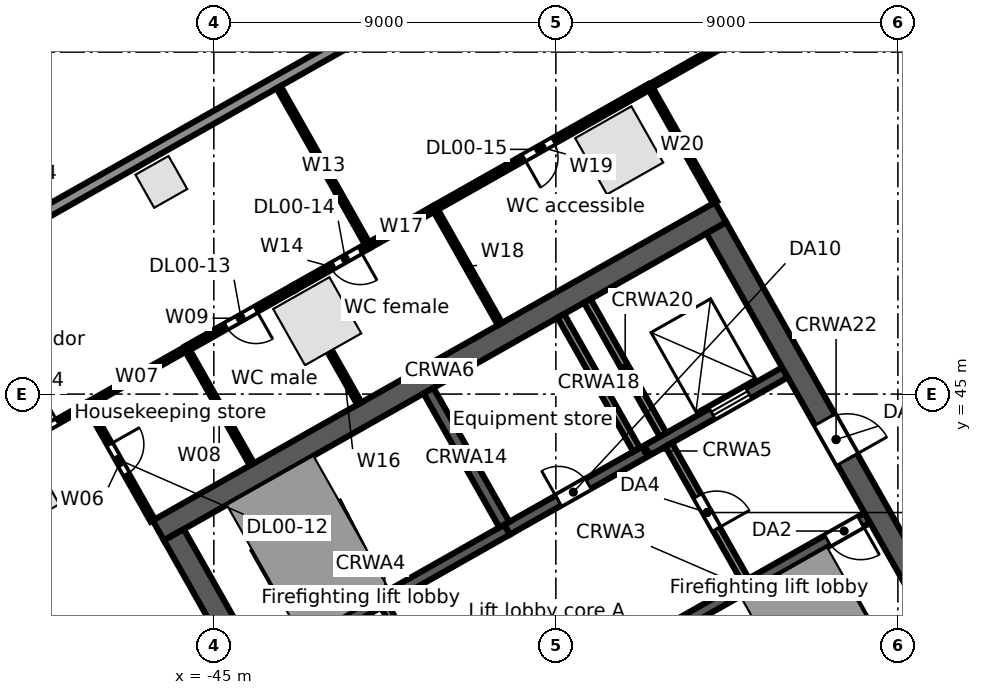
"""IFC4 building model, lengths in metres.
Left out: names, types, materials, properties, quantities, classifications, styles, units other than length and angle.
Written with IfcOpenShell. Run it as: python <this file> out.ifc"""

import sys

from ifc_helpers import new_model, si_unit, direction, frame, frame_2d, origin, origin_2d, place, context, subcontext, project, spatial, rectangle, extrude, element, fill, save


model = new_model("IFC4")
c1 = context("Model", 3, precision=1e-05, world=origin(), true_north=direction((0.0, 1.0)))
c2 = subcontext(c1, "Body", "Model", "MODEL_VIEW")
j1 = project(units=[si_unit("LENGTHUNIT", "METRE"), si_unit("PLANEANGLEUNIT", "RADIAN")], contexts=[c1])
p1 = place(None, origin())
s1 = spatial("IfcSite", under=j1, at=p1, CompositionType="ELEMENT")
p2 = place(p1, origin())
s2 = spatial("IfcBuilding", under=s1, at=p2, CompositionType="ELEMENT")
p3 = place(p2, origin())
s3 = spatial("IfcBuildingStorey", under=s2, at=p3, CompositionType="ELEMENT", Elevation=0.0)
for number, where, z_axis, x_axis in (
    (1, (-34.334, 51.414, 0.0), (0.0, 0.0, 1.0), (-0.87, -0.492, 0.0)),
    (2, (-42.28, 46.919, 0.0), (0.0, 0.0, 1.0), (-0.87, -0.492, 0.0)),
    (3, (-50.226, 42.423, 0.0), (0.0, 0.0, 1.0), (-0.87, -0.492, 0.0)),
):
    element("IfcColumn", number, at=place(p3, frame(where, z_axis=z_axis, x_axis=x_axis)), inside=s3, PredefinedType="COLUMN", context=c2, shape_type="SweptSolid", body=[
        extrude(rectangle(XDim=1.7, YDim=1.7, at=origin_2d()), origin(), (0.0, 0.0, 1.0), 6.5),
    ])
p4 = place(p3, frame((-46.381, 50.584, 0.0), z_axis=(0.0, 0.0, 1.0), x_axis=(-0.87035569594, -0.492423560103, 0.0)))
e4 = element("IfcColumn", 4, at=p4, inside=s3, PredefinedType="COLUMN", context=c2, shape_type="SweptSolid", body=[
    extrude(rectangle(XDim=1.0, YDim=1.0, at=origin_2d()), origin(), (0.0, 0.0, 1.0), 6.5),
])
p5 = place(p3, frame((-63.707, 41.701, 0.0), z_axis=(0.0, 0.0, 1.0), x_axis=(0.870355510268, 0.492423888277, 0.0)))
e5 = element("IfcWall", 5, at=p5, inside=s3, PredefinedType="STANDARD", context=c2, shape_type="SweptSolid", body=[
    extrude(rectangle(XDim=67.903, YDim=0.3, at=frame_2d((33.952, 0.0))), origin(), (0.0, 0.0, 1.0), 6.15),
])
p6 = place(p5, frame((44.274, 0.0, 0.0)))
e6 = element("IfcOpeningElement", 6, at=p6, cuts=e5, PredefinedType="OPENING", context=c2, shape_type="SweptSolid", body=[
    extrude(rectangle(XDim=1.2, YDim=2.4, at=frame_2d((0.6, 1.2))), frame((0.0, 0.16, 0.0), z_axis=(0.0, -1.0, 0.0), x_axis=(1.0, 0.0, 0.0)), (0.0, 0.0, 1.0), 0.32),
])
p7 = place(p5, frame((15.222, 0.0, 0.0)))
e7 = element("IfcOpeningElement", 7, at=p7, cuts=e5, PredefinedType="OPENING", context=c2, shape_type="SweptSolid", body=[
    extrude(rectangle(XDim=1.2, YDim=2.4, at=frame_2d((0.6, 1.2))), frame((0.0, 0.16, 0.0), z_axis=(0.0, -1.0, 0.0), x_axis=(1.0, 0.0, 0.0)), (0.0, 0.0, 1.0), 0.32),
])
p8 = place(p3, frame((-34.245, 38.097, 0.0), z_axis=(0.0, 0.0, 1.0), x_axis=(0.870364910201, 0.492407273597, 0.0)))
e8 = element("IfcWall", 8, at=p8, inside=s3, PredefinedType="SOLIDWALL", context=c2, shape_type="SweptSolid", body=[
    extrude(rectangle(XDim=7.4, YDim=0.3, at=frame_2d((3.7, 0.0))), origin(), (0.0, 0.0, 1.0), 6.15),
])
p9 = place(p8, frame((6.2, 0.0, 0.0)))
e9 = element("IfcOpeningElement", 9, at=p9, cuts=e8, PredefinedType="OPENING", context=c2, shape_type="SweptSolid", body=[
    extrude(rectangle(XDim=1.0, YDim=2.1, at=frame_2d((0.5, 1.05))), frame((0.0, 0.16, 0.0), z_axis=(0.0, -1.0, 0.0), x_axis=(1.0, 0.0, 0.0)), (0.0, 0.0, 1.0), 0.32),
])
p10 = place(p3, frame((-43.723, 37.791, 0.0), z_axis=(0.0, 0.0, 1.0), x_axis=(0.87035077051, 0.49243226567, 0.0)))
e10 = element("IfcWall", 10, at=p10, inside=s3, PredefinedType="SOLIDWALL", context=c2, shape_type="SweptSolid", body=[
    extrude(rectangle(XDim=7.4, YDim=0.3, at=frame_2d((3.7, 0.0))), origin(), (0.0, 0.0, 1.0), 6.15),
])
p11 = place(p10, frame((0.2, 0.0, 0.0)))
e11 = element("IfcOpeningElement", 11, at=p11, cuts=e10, PredefinedType="OPENING", context=c2, shape_type="SweptSolid", body=[
    extrude(rectangle(XDim=1.0, YDim=2.1, at=frame_2d((0.5, 1.05))), frame((0.0, 0.16, 0.0), z_axis=(0.0, -1.0, 0.0), x_axis=(1.0, 0.0, 0.0)), (0.0, 0.0, 1.0), 0.32),
])
p12 = place(p3, frame((-37.282, 41.435, 0.0), z_axis=(0.0, 0.0, 1.0), x_axis=(0.870356516133, 0.492422110414, 0.0)))
e12 = element("IfcWall", 12, at=p12, inside=s3, PredefinedType="SOLIDWALL", context=c2, shape_type="SweptSolid", body=[
    extrude(rectangle(XDim=8.4, YDim=0.3, at=frame_2d((4.2, 0.0))), origin(), (0.0, 0.0, 1.0), 6.15),
])
p13 = place(p12, frame((6.2, 0.0, 0.0)))
e13 = element("IfcOpeningElement", 13, at=p13, cuts=e12, PredefinedType="OPENING", context=c2, shape_type="SweptSolid", body=[
    extrude(rectangle(XDim=1.1, YDim=2.1, at=frame_2d((0.55, 1.05))), frame((0.0, 0.16, 0.0), z_axis=(0.0, -1.0, 0.0), x_axis=(1.0, 0.0, 0.0)), (0.0, 0.0, 1.0), 0.32),
])
p14 = place(p12, frame((1.55, 0.0, 0.0)))
e14 = element("IfcOpeningElement", 14, at=p14, cuts=e12, PredefinedType="OPENING", context=c2, shape_type="SweptSolid", body=[
    extrude(rectangle(XDim=0.9, YDim=2.1, at=frame_2d((0.45, 1.05))), frame((0.0, 0.16, 0.0), z_axis=(0.0, -1.0, 0.0), x_axis=(1.0, 0.0, 0.0)), (0.0, 0.0, 1.0), 0.32),
])
p15 = place(p3, frame((-46.461, 41.412, 0.0), z_axis=(0.0, 0.0, 1.0), x_axis=(0.870350116061, 0.492433422375, 0.0)))
e15 = element("IfcWall", 15, at=p15, inside=s3, PredefinedType="SOLIDWALL", context=c2, shape_type="SweptSolid", body=[
    extrude(rectangle(XDim=17.0, YDim=0.6, at=frame_2d((8.5, 0.0))), origin(), (0.0, 0.0, 1.0), 6.15),
])
p16 = place(p3, frame((-46.052, 41.298, 0.0), z_axis=(0.0, 0.0, 1.0), x_axis=(0.492418598281, -0.870358503186, 0.0)))
e16 = element("IfcWall", 16, at=p16, inside=s3, PredefinedType="SOLIDWALL", context=c2, shape_type="SweptSolid", body=[
    extrude(rectangle(XDim=12.8, YDim=0.6, at=frame_2d((6.4, 0.0))), origin(), (0.0, 0.0, 1.0), 6.15),
])
p17 = place(p16, frame((5.8, 0.0, 0.0)))
e17 = element("IfcOpeningElement", 17, at=p17, cuts=e16, PredefinedType="OPENING", context=c2, shape_type="SweptSolid", body=[
    extrude(rectangle(XDim=1.2, YDim=2.1, at=frame_2d((0.6, 1.05))), frame((0.0, 0.31, 0.0), z_axis=(0.0, -1.0, 0.0), x_axis=(1.0, 0.0, 0.0)), (0.0, 0.0, 1.0), 0.62),
])
p18 = place(p3, frame((-40.516, 39.433, 0.0), z_axis=(0.0, 0.0, 1.0), x_axis=(0.492453559952, -0.87033872216, 0.0)))
e18 = element("IfcWall", 18, at=p18, inside=s3, PredefinedType="PARTITIONING", context=c2, shape_type="SweptSolid", body=[
    extrude(rectangle(XDim=4.1, YDim=0.2, at=frame_2d((2.05, 0.0))), origin(), (0.0, 0.0, 1.0), 6.15),
])
p19 = place(p18, frame((1.55, 0.0, 0.0)))
e19 = element("IfcOpeningElement", 19, at=p19, cuts=e18, PredefinedType="OPENING", context=c2, shape_type="SweptSolid", body=[
    extrude(rectangle(XDim=1.0, YDim=2.1, at=frame_2d((0.5, 1.05))), frame((0.0, 0.11, 0.0), z_axis=(0.0, -1.0, 0.0), x_axis=(1.0, 0.0, 0.0)), (0.0, 0.0, 1.0), 0.22),
])
p20 = place(p3, frame((-39.35, 45.09, 0.0), z_axis=(0.0, 0.0, 1.0), x_axis=(0.49241474071, -0.870360685654, 0.0)))
e20 = element("IfcWall", 20, at=p20, inside=s3, PredefinedType="SOLIDWALL", context=c2, shape_type="SweptSolid", body=[
    extrude(rectangle(XDim=4.05, YDim=0.3, at=frame_2d((2.025, 0.0))), origin(), (0.0, 0.0, 1.0), 6.15),
])
p21 = place(p3, frame((-35.869, 47.06, 0.0), z_axis=(0.0, 0.0, 1.0), x_axis=(0.49241474071, -0.870360685654, 0.0)))
e21 = element("IfcWall", 21, at=p21, inside=s3, PredefinedType="SOLIDWALL", context=c2, shape_type="SweptSolid", body=[
    extrude(rectangle(XDim=4.05, YDim=0.2, at=frame_2d((2.025, 0.0))), origin(), (0.0, 0.0, 1.0), 6.15),
])
p22 = place(p3, frame((-33.031, 43.667, 0.0), z_axis=(0.0, 0.0, 1.0), x_axis=(0.492408451753, -0.87036424366, 0.0)))
e22 = element("IfcWall", 22, at=p22, inside=s3, PredefinedType="PARTITIONING", context=c2, shape_type="SweptSolid", body=[
    extrude(rectangle(XDim=4.1, YDim=0.2, at=frame_2d((2.05, 0.0))), origin(), (0.0, 0.0, 1.0), 6.15),
])
p23 = place(p22, frame((1.55, 0.0, 0.0)))
e23 = element("IfcOpeningElement", 23, at=p23, cuts=e22, PredefinedType="OPENING", context=c2, shape_type="SweptSolid", body=[
    extrude(rectangle(XDim=1.0, YDim=2.1, at=frame_2d((0.5, 1.05))), frame((0.0, 0.11, 0.0), z_axis=(0.0, -1.0, 0.0), x_axis=(1.0, 0.0, 0.0)), (0.0, 0.0, 1.0), 0.22),
])
p24 = place(p3, frame((-35.173, 47.454, 0.0), z_axis=(0.0, 0.0, 1.0), x_axis=(0.492440575896, -0.870346068648, 0.0)))
e24 = element("IfcWall", 24, at=p24, inside=s3, PredefinedType="SOLIDWALL", context=c2, shape_type="SweptSolid", body=[
    extrude(rectangle(XDim=4.05, YDim=0.2, at=frame_2d((2.025, 0.0))), origin(), (0.0, 0.0, 1.0), 6.15),
])
p25 = place(p3, frame((-31.778, 49.374, 0.0), z_axis=(0.0, 0.0, 1.0), x_axis=(0.492433046652, -0.870350328641, 0.0)))
e25 = element("IfcWall", 25, at=p25, inside=s3, PredefinedType="SOLIDWALL", context=c2, shape_type="SweptSolid", body=[
    extrude(rectangle(XDim=12.8, YDim=0.6, at=frame_2d((6.4, 0.0))), origin(), (0.0, 0.0, 1.0), 6.15),
])
p26 = place(p25, frame((5.8, 0.0, 0.0)))
e26 = element("IfcOpeningElement", 26, at=p26, cuts=e25, PredefinedType="OPENING", context=c2, shape_type="SweptSolid", body=[
    extrude(rectangle(XDim=1.2, YDim=2.1, at=frame_2d((0.6, 1.05))), frame((0.0, 0.31, 0.0), z_axis=(0.0, -1.0, 0.0), x_axis=(1.0, 0.0, 0.0)), (0.0, 0.0, 1.0), 0.62),
])
p27 = place(p3, frame((-51.596, 42.873, 0.0), z_axis=(0.0, 0.0, 1.0), x_axis=(0.87043427122, 0.492284652905, 0.0)))
e27 = element("IfcWall", 27, at=p27, inside=s3, PredefinedType="PARTITIONING", context=c2, shape_type="SweptSolid", body=[
    extrude(rectangle(XDim=3.75, YDim=0.125, at=frame_2d((1.875, 0.0))), origin(), (0.0, 0.0, 1.0), 6.15),
])
p28 = place(p27, frame((1.95, 0.0, 0.0)))
e28 = element("IfcOpeningElement", 28, at=p28, cuts=e27, PredefinedType="OPENING", context=c2, shape_type="SweptSolid", body=[
    extrude(rectangle(XDim=0.9, YDim=2.1, at=frame_2d((0.45, 1.05))), frame((0.0, 0.073, 0.0), z_axis=(0.0, -1.0, 0.0), x_axis=(1.0, 0.0, 0.0)), (0.0, 0.0, 1.0), 0.145),
])
p29 = place(p3, frame((-51.596, 42.873, 0.0), z_axis=(0.0, 0.0, 1.0), x_axis=(0.492435038471, -0.870349201692, 0.0)))
e29 = element("IfcWall", 29, at=p29, inside=s3, PredefinedType="PARTITIONING", context=c2, shape_type="SweptSolid", body=[
    extrude(rectangle(XDim=15.501, YDim=0.125, at=frame_2d((7.75, 0.0))), origin(), (0.0, 0.0, 1.0), 5.212),
])
p30 = place(p29, frame((7.2, 0.0, 0.0)))
e30 = element("IfcOpeningElement", 30, at=p30, cuts=e29, PredefinedType="OPENING", context=c2, shape_type="SweptSolid", body=[
    extrude(rectangle(XDim=0.9, YDim=2.1, at=frame_2d((0.45, 1.05))), frame((0.0, 0.073, 0.0), z_axis=(0.0, -1.0, 0.0), x_axis=(1.0, 0.0, 0.0)), (0.0, 0.0, 1.0), 0.145),
])
p31 = place(p3, frame((-48.332, 44.719, 0.0), z_axis=(0.0, 0.0, 1.0), x_axis=(0.492392845909, -0.87037307248, 0.0)))
e31 = element("IfcWall", 31, at=p31, inside=s3, PredefinedType="PARTITIONING", context=c2, shape_type="SweptSolid", body=[
    extrude(rectangle(XDim=3.5, YDim=0.125, at=frame_2d((1.75, 0.0))), origin(), (0.0, 0.0, 1.0), 5.43),
])
p32 = place(p31, frame((1.2, 0.0, 0.0)))
e32 = element("IfcOpeningElement", 32, at=p32, cuts=e31, PredefinedType="OPENING", context=c2, shape_type="SweptSolid", body=[
    extrude(rectangle(XDim=0.9, YDim=2.1, at=frame_2d((0.45, 1.05))), frame((0.0, 0.073, 0.0), z_axis=(0.0, -1.0, 0.0), x_axis=(1.0, 0.0, 0.0)), (0.0, 0.0, 1.0), 0.145),
])
p33 = place(p3, frame((-48.332, 44.719, 0.0), z_axis=(0.0, 0.0, 1.0), x_axis=(0.870388475779, 0.492365617434, 0.0)))
e33 = element("IfcWall", 33, at=p33, inside=s3, PredefinedType="PARTITIONING", context=c2, shape_type="SweptSolid", body=[
    extrude(rectangle(XDim=3.0, YDim=0.125, at=frame_2d((1.5, 0.0))), origin(), (0.0, 0.0, 1.0), 6.15),
])
p34 = place(p3, frame((-45.721, 46.196, 0.0), z_axis=(0.0, 0.0, 1.0), x_axis=(0.492310098002, -0.870419879946, 0.0)))
e34 = element("IfcWall", 34, at=p34, inside=s3, PredefinedType="PARTITIONING", context=c2, shape_type="SweptSolid", body=[
    extrude(rectangle(XDim=3.5, YDim=0.125, at=frame_2d((1.75, 0.0))), origin(), (0.0, 0.0, 1.0), 5.43),
])
p35 = place(p3, frame((-45.721, 46.196, 0.0), z_axis=(0.0, 0.0, 1.0), x_axis=(0.870278724491, 0.492559581877, 0.0)))
e35 = element("IfcWall", 35, at=p35, inside=s3, PredefinedType="PARTITIONING", context=c2, shape_type="SweptSolid", body=[
    extrude(rectangle(XDim=3.25, YDim=0.15, at=frame_2d((1.625, 0.0))), origin(), (0.0, 0.0, 1.0), 5.53),
])
p36 = place(p35, frame((1.2, 0.0, 0.0)))
e36 = element("IfcOpeningElement", 36, at=p36, cuts=e35, PredefinedType="OPENING", context=c2, shape_type="SweptSolid", body=[
    extrude(rectangle(XDim=0.9, YDim=2.1, at=frame_2d((0.45, 1.05))), frame((0.0, 0.085, 0.0), z_axis=(0.0, -1.0, 0.0), x_axis=(1.0, 0.0, 0.0)), (0.0, 0.0, 1.0), 0.17),
])
p37 = place(p3, frame((-43.295, 53.077, 0.0), z_axis=(0.0, 0.0, 1.0), x_axis=(0.492503605136, -0.87031040378, 0.0)))
e37 = element("IfcWall", 37, at=p37, inside=s3, PredefinedType="PARTITIONING", context=c2, shape_type="SweptSolid", body=[
    extrude(rectangle(XDim=4.793, YDim=0.125, at=frame_2d((2.397, 0.0))), origin(), (0.0, 0.0, 1.0), 5.43),
])
p38 = place(p3, frame((-42.892, 47.797, 0.0), z_axis=(0.0, 0.0, 1.0), x_axis=(0.870332332106, 0.492464853254, 0.0)))
e38 = element("IfcWall", 38, at=p38, inside=s3, PredefinedType="PARTITIONING", context=c2, shape_type="SweptSolid", body=[
    extrude(rectangle(XDim=2.25, YDim=0.15, at=frame_2d((1.125, 0.0))), origin(), (0.0, 0.0, 1.0), 6.15),
])
p39 = place(p38, frame((1.1, 0.0, 0.0)))
e39 = element("IfcOpeningElement", 39, at=p39, cuts=e38, PredefinedType="OPENING", context=c2, shape_type="SweptSolid", body=[
    extrude(rectangle(XDim=0.9, YDim=2.1, at=frame_2d((0.45, 1.05))), frame((0.0, 0.085, 0.0), z_axis=(0.0, -1.0, 0.0), x_axis=(1.0, 0.0, 0.0)), (0.0, 0.0, 1.0), 0.17),
])
p40 = place(p3, frame((-41.949, 46.129, 0.0), z_axis=(0.0, 0.0, 1.0), x_axis=(0.492366981934, -0.870387703901, 0.0)))
e40 = element("IfcWall", 40, at=p40, inside=s3, PredefinedType="PARTITIONING", context=c2, shape_type="SweptSolid", body=[
    extrude(rectangle(XDim=1.584, YDim=0.125, at=frame_2d((0.792, 0.0))), origin(), (0.0, 0.0, 1.0), 5.73),
])
p41 = place(p3, frame((-40.934, 48.905, 0.0), z_axis=(0.0, 0.0, 1.0), x_axis=(0.870592396556, 0.492004958368, 0.0)))
e41 = element("IfcWall", 41, at=p41, inside=s3, PredefinedType="PARTITIONING", context=c2, shape_type="SweptSolid", body=[
    extrude(rectangle(XDim=2.0, YDim=0.15, at=frame_2d((1.0, 0.0))), origin(), (0.0, 0.0, 1.0), 6.15),
])
p42 = place(p3, frame((-39.193, 49.889, 0.0), z_axis=(0.0, 0.0, 1.0), x_axis=(0.492392845909, -0.87037307248, 0.0)))
e42 = element("IfcWall", 42, at=p42, inside=s3, PredefinedType="PARTITIONING", context=c2, shape_type="SweptSolid", body=[
    extrude(rectangle(XDim=3.5, YDim=0.125, at=frame_2d((1.75, 0.0))), origin(), (0.0, 0.0, 1.0), 5.43),
])
p43 = place(p3, frame((-39.193, 49.889, 0.0), z_axis=(0.0, 0.0, 1.0), x_axis=(0.870324897112, 0.492477992876, 0.0)))
e43 = element("IfcWall", 43, at=p43, inside=s3, PredefinedType="PARTITIONING", context=c2, shape_type="SweptSolid", body=[
    extrude(rectangle(XDim=6.5, YDim=0.15, at=frame_2d((3.25, 0.0))), origin(), (0.0, 0.0, 1.0), 5.53),
])
p44 = place(p43, frame((2.7, 0.0, 0.0)))
e44 = element("IfcOpeningElement", 44, at=p44, cuts=e43, PredefinedType="OPENING", context=c2, shape_type="SweptSolid", body=[
    extrude(rectangle(XDim=0.9, YDim=2.1, at=frame_2d((0.45, 1.05))), frame((0.0, 0.085, 0.0), z_axis=(0.0, -1.0, 0.0), x_axis=(1.0, 0.0, 0.0)), (0.0, 0.0, 1.0), 0.17),
])
p45 = place(p3, frame((-33.536, 53.09, 0.0), z_axis=(0.0, 0.0, 1.0), x_axis=(0.492521469645, -0.870300294116, 0.0)))
e45 = element("IfcWall", 45, at=p45, inside=s3, PredefinedType="PARTITIONING", context=c2, shape_type="SweptSolid", body=[
    extrude(rectangle(XDim=3.5, YDim=0.125, at=frame_2d((1.75, 0.0))), origin(), (0.0, 0.0, 1.0), 5.43),
])
p46 = place(p3, frame((-33.536, 53.09, 0.0), z_axis=(0.0, 0.0, 1.0), x_axis=(0.870327439455, 0.492473499928, 0.0)))
e46 = element("IfcWall", 46, at=p46, inside=s3, PredefinedType="PARTITIONING", context=c2, shape_type="SweptSolid", body=[
    extrude(rectangle(XDim=8.0, YDim=0.125, at=frame_2d((4.0, 0.0))), origin(), (0.0, 0.0, 1.0), 5.212),
])
p47 = place(p46, frame((3.45, 0.0, 0.0)))
e47 = element("IfcOpeningElement", 47, at=p47, cuts=e46, PredefinedType="OPENING", context=c2, shape_type="SweptSolid", body=[
    extrude(rectangle(XDim=0.9, YDim=2.1, at=frame_2d((0.45, 1.05))), frame((0.0, 0.073, 0.0), z_axis=(0.0, -1.0, 0.0), x_axis=(1.0, 0.0, 0.0)), (0.0, 0.0, 1.0), 0.145),
])
p48 = place(p13, origin())
e48 = element("IfcDoor", 48, at=p48, inside=s3, OperationType="DOUBLE_DOOR_SLIDING", PredefinedType="DOOR", context=c2, shape_type="SweptSolid", body=[
    extrude(rectangle(XDim=1.1, YDim=2.1, at=frame_2d((0.55, 1.05))), frame((0.0, 0.025, 0.0), z_axis=(0.0, -1.0, 0.0), x_axis=(1.0, 0.0, 0.0)), (0.0, 0.0, 1.0), 0.05),
])
fill(e13, e48)
p49 = place(p9, frame((1.0, 0.0, 0.0), z_axis=(0.0, 0.0, 1.0), x_axis=(-1.0, 0.0, 0.0)))
e49 = element("IfcDoor", 49, at=p49, inside=s3, OperationType="SINGLE_SWING_LEFT", PredefinedType="DOOR", context=c2, shape_type="SweptSolid", body=[
    extrude(rectangle(XDim=1.0, YDim=2.1, at=frame_2d((0.5, 1.05))), frame((0.0, 0.025, 0.0), z_axis=(0.0, -1.0, 0.0), x_axis=(1.0, 0.0, 0.0)), (0.0, 0.0, 1.0), 0.05),
])
fill(e9, e49)
p50 = place(p23, origin())
e50 = element("IfcDoor", 50, at=p50, inside=s3, OperationType="SINGLE_SWING_RIGHT", PredefinedType="DOOR", context=c2, shape_type="SweptSolid", body=[
    extrude(rectangle(XDim=1.0, YDim=2.1, at=frame_2d((0.5, 1.05))), frame((0.0, 0.025, 0.0), z_axis=(0.0, -1.0, 0.0), x_axis=(1.0, 0.0, 0.0)), (0.0, 0.0, 1.0), 0.05),
])
fill(e23, e50)
p51 = place(p26, origin())
e51 = element("IfcDoor", 51, at=p51, inside=s3, OperationType="SINGLE_SWING_RIGHT", PredefinedType="DOOR", context=c2, shape_type="SweptSolid", body=[
    extrude(rectangle(XDim=1.2, YDim=2.1, at=frame_2d((0.6, 1.05))), frame((0.0, 0.025, 0.0), z_axis=(0.0, -1.0, 0.0), x_axis=(1.0, 0.0, 0.0)), (0.0, 0.0, 1.0), 0.05),
])
fill(e26, e51)
p52 = place(p14, origin())
e52 = element("IfcDoor", 52, at=p52, inside=s3, OperationType="SINGLE_SWING_LEFT", PredefinedType="DOOR", context=c2, shape_type="SweptSolid", body=[
    extrude(rectangle(XDim=0.9, YDim=2.1, at=frame_2d((0.45, 1.05))), frame((0.0, 0.025, 0.0), z_axis=(0.0, -1.0, 0.0), x_axis=(1.0, 0.0, 0.0)), (0.0, 0.0, 1.0), 0.05),
])
fill(e14, e52)
p53 = place(p28, origin())
e53 = element("IfcDoor", 53, at=p53, inside=s3, OperationType="SINGLE_SWING_RIGHT", PredefinedType="DOOR", context=c2, shape_type="SweptSolid", body=[
    extrude(rectangle(XDim=0.9, YDim=2.1, at=frame_2d((0.45, 1.05))), frame((0.0, 0.025, 0.0), z_axis=(0.0, -1.0, 0.0), x_axis=(1.0, 0.0, 0.0)), (0.0, 0.0, 1.0), 0.05),
])
fill(e28, e53)
p54 = place(p32, origin())
e54 = element("IfcDoor", 54, at=p54, inside=s3, OperationType="SINGLE_SWING_LEFT", PredefinedType="DOOR", context=c2, shape_type="SweptSolid", body=[
    extrude(rectangle(XDim=0.9, YDim=2.1, at=frame_2d((0.45, 1.05))), frame((0.0, 0.025, 0.0), z_axis=(0.0, -1.0, 0.0), x_axis=(1.0, 0.0, 0.0)), (0.0, 0.0, 1.0), 0.05),
])
fill(e32, e54)
p55 = place(p36, frame((0.9, 0.0, 0.0), z_axis=(0.0, 0.0, 1.0), x_axis=(-1.0, 0.0, 0.0)))
e55 = element("IfcDoor", 55, at=p55, inside=s3, OperationType="SINGLE_SWING_LEFT", PredefinedType="DOOR", context=c2, shape_type="SweptSolid", body=[
    extrude(rectangle(XDim=0.9, YDim=2.1, at=frame_2d((0.45, 1.05))), frame((0.0, 0.025, 0.0), z_axis=(0.0, -1.0, 0.0), x_axis=(1.0, 0.0, 0.0)), (0.0, 0.0, 1.0), 0.05),
])
fill(e36, e55)
p56 = place(p39, frame((0.9, 0.0, 0.0), z_axis=(0.0, 0.0, 1.0), x_axis=(-1.0, 0.0, 0.0)))
e56 = element("IfcDoor", 56, at=p56, inside=s3, OperationType="SINGLE_SWING_LEFT", PredefinedType="DOOR", context=c2, shape_type="SweptSolid", body=[
    extrude(rectangle(XDim=0.9, YDim=2.1, at=frame_2d((0.45, 1.05))), frame((0.0, 0.025, 0.0), z_axis=(0.0, -1.0, 0.0), x_axis=(1.0, 0.0, 0.0)), (0.0, 0.0, 1.0), 0.05),
])
fill(e39, e56)
p57 = place(p44, frame((0.9, 0.0, 0.0), z_axis=(0.0, 0.0, 1.0), x_axis=(-1.0, 0.0, 0.0)))
e57 = element("IfcDoor", 57, at=p57, inside=s3, OperationType="SINGLE_SWING_RIGHT", PredefinedType="DOOR", context=c2, shape_type="SweptSolid", body=[
    extrude(rectangle(XDim=0.9, YDim=2.1, at=frame_2d((0.45, 1.05))), frame((0.0, 0.025, 0.0), z_axis=(0.0, -1.0, 0.0), x_axis=(1.0, 0.0, 0.0)), (0.0, 0.0, 1.0), 0.05),
])
fill(e44, e57)
save(model, sys.argv[1])
